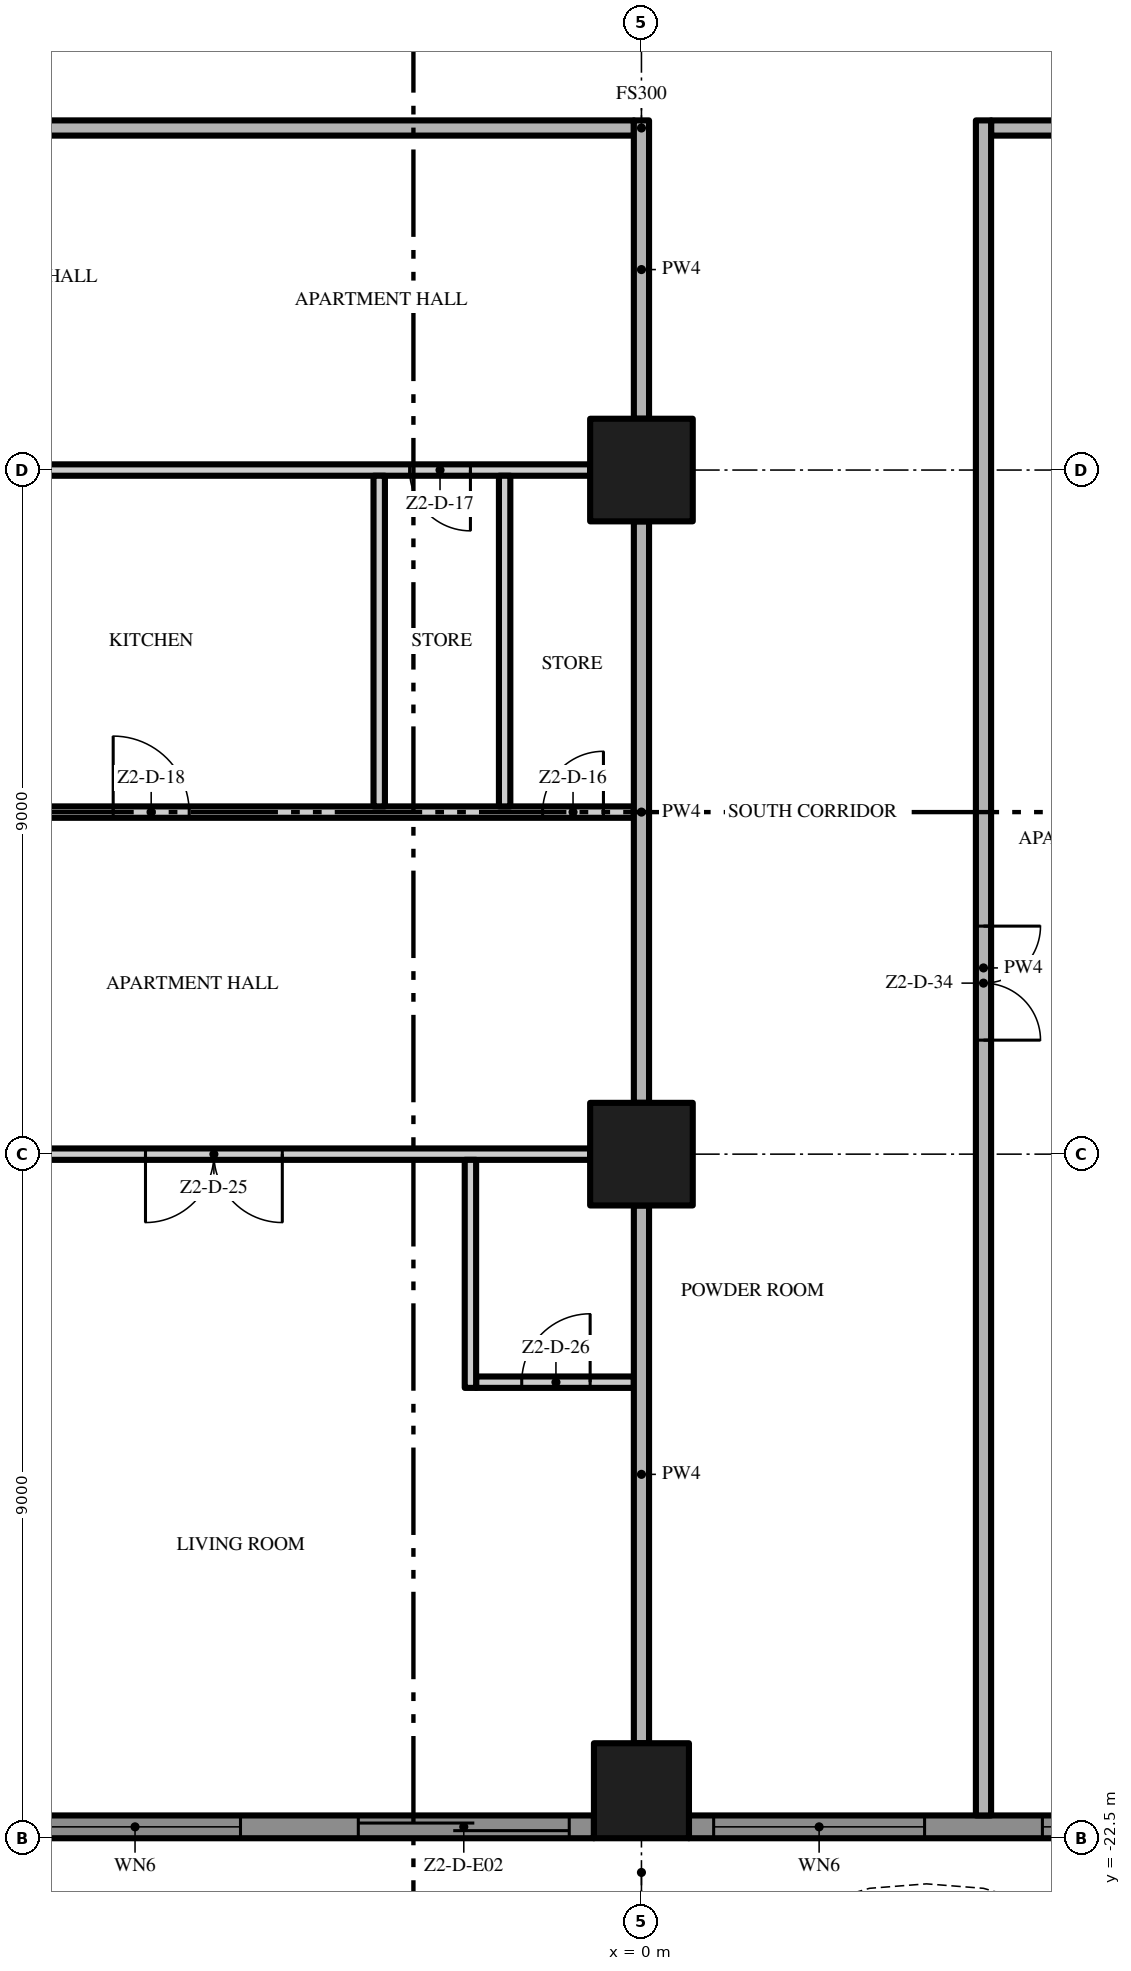
"""IFC4 building model, lengths in metres.
Left out: names, types, materials, properties, quantities, classifications, styles, units other than length and angle.
Written with IfcOpenShell. Run it as: python <this file> out.ifc"""

import sys

from ifc_helpers import new_model, si_unit, direction, frame, frame_2d, origin, origin_2d, place, context, subcontext, project, spatial, polyline, rectangle, outline, extrude, element, fill, save


model = new_model("IFC4")
c1 = context("Model", 3, precision=1e-05, world=origin(), true_north=direction((0.0, 1.0)))
c2 = subcontext(c1, "Body", "Model", "MODEL_VIEW")
j1 = project(units=[si_unit("LENGTHUNIT", "METRE"), si_unit("PLANEANGLEUNIT", "RADIAN")], contexts=[c1])
p1 = place(None, origin())
s1 = spatial("IfcSite", under=j1, at=p1, CompositionType="ELEMENT")
p2 = place(p1, origin())
s2 = spatial("IfcBuilding", under=s1, at=p2, CompositionType="ELEMENT")
p3 = place(p2, frame((0.0, 0.0, 107.4)))
s3 = spatial("IfcBuildingStorey", under=s2, at=p3, CompositionType="ELEMENT", Elevation=107.4)
p4 = place(p3, frame((0.0, -13.5, 0.0), z_axis=(0.0, 0.0, 1.0), x_axis=(1.0, 0.0, 0.0)))
e1 = element("IfcColumn", 1, at=p4, inside=s3, PredefinedType="COLUMN", context=c2, shape_type="SweptSolid", body=[
    extrude(rectangle(XDim=1.35, YDim=1.35, at=origin_2d()), origin(), (0.0, 0.0, 1.0), 3.5),
])
p5 = place(p3, frame((0.0, -21.875, 0.0), z_axis=(0.0, 0.0, 1.0), x_axis=(1.0, 0.0, 0.0)))
e2 = element("IfcColumn", 2, at=p5, inside=s3, PredefinedType="COLUMN", context=c2, shape_type="SweptSolid", body=[
    extrude(rectangle(XDim=1.25, YDim=1.25, at=origin_2d()), origin(), (0.0, 0.0, 1.0), 3.5),
])
p6 = place(p3, frame((0.0, -4.5, 0.0), z_axis=(0.0, 0.0, 1.0), x_axis=(1.0, 0.0, 0.0)))
e3 = element("IfcColumn", 3, at=p6, inside=s3, PredefinedType="COLUMN", context=c2, shape_type="SweptSolid", body=[
    extrude(rectangle(XDim=1.35, YDim=1.35, at=origin_2d()), origin(), (0.0, 0.0, 1.0), 3.5),
])
p7 = place(p3, frame((-0.625, -22.35, 0.0), z_axis=(0.0, 0.0, 1.0), x_axis=(-1.0, 0.0, 0.0)))
e4 = element("IfcWall", 4, at=p7, inside=s3, PredefinedType="SOLIDWALL", context=c2, shape_type="SweptSolid", body=[
    extrude(rectangle(XDim=7.75, YDim=0.3, at=frame_2d((3.875, 0.0))), origin(), (0.0, 0.0, 1.0), 3.5),
])
p8 = place(p7, frame((4.65, 0.0, 0.45)))
e5 = element("IfcOpeningElement", 5, at=p8, cuts=e4, PredefinedType="OPENING", context=c2, shape_type="SweptSolid", body=[
    extrude(rectangle(XDim=2.775, YDim=2.65, at=frame_2d((1.387, 1.325))), frame((0.0, 0.16, 0.0), z_axis=(0.0, -1.0, 0.0), x_axis=(1.0, 0.0, 0.0)), (0.0, 0.0, 1.0), 0.32),
])
p9 = place(p7, frame((0.325, 0.0, 0.0)))
e6 = element("IfcOpeningElement", 6, at=p9, cuts=e4, PredefinedType="OPENING", context=c2, shape_type="SweptSolid", body=[
    extrude(rectangle(XDim=2.775, YDim=2.4, at=frame_2d((1.387, 1.2))), frame((0.0, 0.16, 0.0), z_axis=(0.0, -1.0, 0.0), x_axis=(1.0, 0.0, 0.0)), (0.0, 0.0, 1.0), 0.32),
])
p10 = place(p3, frame((8.375, -22.35, 0.0), z_axis=(0.0, 0.0, 1.0), x_axis=(-1.0, 0.0, 0.0)))
e7 = element("IfcWall", 7, at=p10, inside=s3, PredefinedType="SOLIDWALL", context=c2, shape_type="SweptSolid", body=[
    extrude(rectangle(XDim=7.75, YDim=0.3, at=frame_2d((3.875, 0.0))), origin(), (0.0, 0.0, 1.0), 3.5),
])
p11 = place(p10, frame((4.65, 0.0, 0.45)))
e8 = element("IfcOpeningElement", 8, at=p11, cuts=e7, PredefinedType="OPENING", context=c2, shape_type="SweptSolid", body=[
    extrude(rectangle(XDim=2.775, YDim=2.65, at=frame_2d((1.387, 1.325))), frame((0.0, 0.16, 0.0), z_axis=(0.0, -1.0, 0.0), x_axis=(1.0, 0.0, 0.0)), (0.0, 0.0, 1.0), 0.32),
])
p12 = place(p10, frame((0.325, 0.0, 0.45)))
e9 = element("IfcOpeningElement", 9, at=p12, cuts=e7, PredefinedType="OPENING", context=c2, shape_type="SweptSolid", body=[
    extrude(rectangle(XDim=2.775, YDim=2.65, at=frame_2d((1.387, 1.325))), frame((0.0, 0.16, 0.0), z_axis=(0.0, -1.0, 0.0), x_axis=(1.0, 0.0, 0.0)), (0.0, 0.0, 1.0), 0.32),
])
p13 = place(p3, origin())
e10 = element("IfcWall", 10, at=p13, inside=s3, PredefinedType="USERDEFINED", context=c2, shape_type="SweptSolid", body=[
    extrude(outline(polyline([(-22.5, -24.3), (-21.0, -25.005), (-19.5, -25.441), (-18.75, -25.5), (-18.0, -25.441), (-16.5, -25.005), (-15.0, -24.3), (-13.5, -23.595), (-12.0, -23.159), (-11.25, -23.1), (-10.5, -23.159), (-9.0, -23.595), (-7.5, -24.3), (-6.0, -25.005), (-4.5, -25.441), (-3.75, -25.5), (-3.0, -25.441), (-1.5, -25.005), (0.0, -24.3), (1.5, -23.595), (3.0, -23.159), (3.75, -23.1), (4.5, -23.159), (6.0, -23.595), (7.5, -24.3), (9.0, -25.005), (10.5, -25.441), (11.25, -25.5), (12.0, -25.441), (13.5, -25.005), (15.0, -24.3), (16.5, -23.595), (18.0, -23.159), (18.75, -23.1), (19.5, -23.159), (21.0, -23.595), (22.5, -24.3), (22.606, -24.074), (21.089, -23.36), (19.545, -22.911), (18.75, -22.849), (17.955, -22.911), (16.411, -23.36), (14.894, -24.074), (13.411, -24.771), (11.955, -25.194), (11.25, -25.249), (10.545, -25.194), (9.089, -24.771), (7.606, -24.074), (6.089, -23.36), (4.545, -22.911), (3.75, -22.849), (2.955, -22.911), (1.411, -23.36), (-0.106, -24.074), (-1.589, -24.771), (-3.045, -25.194), (-3.75, -25.249), (-4.455, -25.194), (-5.911, -24.771), (-7.394, -24.074), (-8.911, -23.36), (-10.455, -22.911), (-11.25, -22.849), (-12.045, -22.911), (-13.589, -23.36), (-15.106, -24.074), (-16.589, -24.771), (-18.045, -25.194), (-18.75, -25.249), (-19.455, -25.194), (-20.911, -24.771), (-22.394, -24.074), (-22.5, -24.3)])), origin(), (0.0, 0.0, 1.0), 0.9),
])
p14 = place(p3, frame((-2.175, -16.5, 0.0), z_axis=(0.0, 0.0, 1.0), x_axis=(1.0, 0.0, 0.0)))
e11 = element("IfcWall", 11, at=p14, inside=s3, PredefinedType="PARTITIONING", context=c2, shape_type="SweptSolid", body=[
    extrude(rectangle(XDim=2.075, YDim=0.15, at=frame_2d((1.038, 0.0))), origin(), (0.0, 0.0, 1.0), 3.5),
])
p15 = place(p14, frame((0.6, 0.0, 0.0)))
e12 = element("IfcOpeningElement", 12, at=p15, cuts=e11, PredefinedType="OPENING", context=c2, shape_type="SweptSolid", body=[
    extrude(rectangle(XDim=0.9, YDim=2.1, at=frame_2d((0.45, 1.05))), frame((0.0, 0.085, 0.0), z_axis=(0.0, -1.0, 0.0), x_axis=(1.0, 0.0, 0.0)), (0.0, 0.0, 1.0), 0.17),
])
p16 = place(p3, frame((-0.675, -13.5, 0.0), z_axis=(0.0, 0.0, 1.0), x_axis=(-1.0, 0.0, 0.0)))
e13 = element("IfcWall", 13, at=p16, inside=s3, PredefinedType="PARTITIONING", context=c2, shape_type="SweptSolid", body=[
    extrude(rectangle(XDim=7.65, YDim=0.15, at=frame_2d((3.825, 0.0))), origin(), (0.0, 0.0, 1.0), 3.5),
])
p17 = place(p16, frame((4.05, 0.0, 0.0)))
e14 = element("IfcOpeningElement", 14, at=p17, cuts=e13, PredefinedType="OPENING", context=c2, shape_type="SweptSolid", body=[
    extrude(rectangle(XDim=1.8, YDim=2.4, at=frame_2d((0.9, 1.2))), frame((0.0, 0.085, 0.0), z_axis=(0.0, -1.0, 0.0), x_axis=(1.0, 0.0, 0.0)), (0.0, 0.0, 1.0), 0.17),
])
p18 = place(p3, frame((-11.625, -9.0, 0.0), z_axis=(0.0, 0.0, 1.0), x_axis=(1.0, 0.0, 0.0)))
e15 = element("IfcWall", 15, at=p18, inside=s3, PredefinedType="PARTITIONING", context=c2, shape_type="SweptSolid", body=[
    extrude(rectangle(XDim=11.525, YDim=0.15, at=frame_2d((5.763, 0.0))), origin(), (0.0, 0.0, 1.0), 3.5),
])
p19 = place(p18, frame((10.325, 0.0, 0.0)))
e16 = element("IfcOpeningElement", 16, at=p19, cuts=e15, PredefinedType="OPENING", context=c2, shape_type="SweptSolid", body=[
    extrude(rectangle(XDim=0.8, YDim=2.0, at=frame_2d((0.4, 1.0))), frame((0.0, 0.085, 0.0), z_axis=(0.0, -1.0, 0.0), x_axis=(1.0, 0.0, 0.0)), (0.0, 0.0, 1.0), 0.17),
])
p20 = place(p18, frame((4.675, 0.0, 0.0)))
e17 = element("IfcOpeningElement", 17, at=p20, cuts=e15, PredefinedType="OPENING", context=c2, shape_type="SweptSolid", body=[
    extrude(rectangle(XDim=1.0, YDim=2.4, at=frame_2d((0.5, 1.2))), frame((0.0, 0.085, 0.0), z_axis=(0.0, -1.0, 0.0), x_axis=(1.0, 0.0, 0.0)), (0.0, 0.0, 1.0), 0.17),
])
p21 = place(p3, frame((-0.675, -4.5, 0.0), z_axis=(0.0, 0.0, 1.0), x_axis=(-1.0, 0.0, 0.0)))
e18 = element("IfcWall", 18, at=p21, inside=s3, PredefinedType="PARTITIONING", context=c2, shape_type="SweptSolid", body=[
    extrude(rectangle(XDim=7.65, YDim=0.15, at=frame_2d((3.825, 0.0))), origin(), (0.0, 0.0, 1.0), 3.5),
])
p22 = place(p21, frame((1.575, 0.0, 0.0)))
e19 = element("IfcOpeningElement", 19, at=p22, cuts=e18, PredefinedType="OPENING", context=c2, shape_type="SweptSolid", body=[
    extrude(rectangle(XDim=0.8, YDim=2.0, at=frame_2d((0.4, 1.0))), frame((0.0, 0.085, 0.0), z_axis=(0.0, -1.0, 0.0), x_axis=(1.0, 0.0, 0.0)), (0.0, 0.0, 1.0), 0.17),
])
p23 = place(p3, frame((-0.1, 0.0, 0.0), z_axis=(0.0, 0.0, 1.0), x_axis=(-1.0, 0.0, 0.0)))
e20 = element("IfcWall", 20, at=p23, inside=s3, PredefinedType="PARTITIONING", context=c2, shape_type="SweptSolid", body=[
    extrude(rectangle(XDim=17.3, YDim=0.2, at=frame_2d((8.65, 0.0))), origin(), (0.0, 0.0, 1.0), 3.5),
])
p24 = place(p23, frame((8.15, 0.0, 0.0)))
e21 = element("IfcOpeningElement", 21, at=p24, cuts=e20, PredefinedType="OPENING", context=c2, shape_type="SweptSolid", body=[
    extrude(rectangle(XDim=1.5, YDim=2.4, at=frame_2d((0.75, 1.2))), frame((0.0, 0.11, 0.0), z_axis=(0.0, -1.0, 0.0), x_axis=(1.0, 0.0, 0.0)), (0.0, 0.0, 1.0), 0.22),
])
p25 = place(p3, frame((4.6, 0.0, 0.0), z_axis=(0.0, 0.0, 1.0), x_axis=(1.0, 0.0, 0.0)))
e22 = element("IfcWall", 22, at=p25, inside=s3, PredefinedType="PARTITIONING", context=c2, shape_type="SweptSolid", body=[
    extrude(rectangle(XDim=12.8, YDim=0.2, at=frame_2d((6.4, 0.0))), origin(), (0.0, 0.0, 1.0), 3.5),
])
p26 = place(p3, frame((-3.45, -8.925, 0.0), z_axis=(0.0, 0.0, 1.0), x_axis=(0.0, 1.0, 0.0)))
e23 = element("IfcWall", 23, at=p26, inside=s3, PredefinedType="PARTITIONING", context=c2, shape_type="SweptSolid", body=[
    extrude(rectangle(XDim=4.35, YDim=0.15, at=frame_2d((2.175, 0.0))), origin(), (0.0, 0.0, 1.0), 3.5),
])
p27 = place(p3, frame((-2.25, -16.575, 0.0), z_axis=(0.0, 0.0, 1.0), x_axis=(0.0, 1.0, 0.0)))
e24 = element("IfcWall", 24, at=p27, inside=s3, PredefinedType="PARTITIONING", context=c2, shape_type="SweptSolid", body=[
    extrude(rectangle(XDim=3.0, YDim=0.15, at=frame_2d((1.5, 0.0))), origin(), (0.0, 0.0, 1.0), 3.5),
])
p28 = place(p3, frame((-1.8, -8.925, 0.0), z_axis=(0.0, 0.0, 1.0), x_axis=(0.0, 1.0, 0.0)))
e25 = element("IfcWall", 25, at=p28, inside=s3, PredefinedType="PARTITIONING", context=c2, shape_type="SweptSolid", body=[
    extrude(rectangle(XDim=4.35, YDim=0.15, at=frame_2d((2.175, 0.0))), origin(), (0.0, 0.0, 1.0), 3.5),
])
p29 = place(p3, frame((0.0, -21.25, 0.0), z_axis=(0.0, 0.0, 1.0), x_axis=(0.0, 1.0, 0.0)))
e26 = element("IfcWall", 26, at=p29, inside=s3, PredefinedType="PARTITIONING", context=c2, shape_type="SweptSolid", body=[
    extrude(rectangle(XDim=7.075, YDim=0.2, at=frame_2d((3.538, 0.0))), origin(), (0.0, 0.0, 1.0), 3.5),
])
p30 = place(p3, frame((0.0, -12.825, 0.0), z_axis=(0.0, 0.0, 1.0), x_axis=(0.0, 1.0, 0.0)))
e27 = element("IfcWall", 27, at=p30, inside=s3, PredefinedType="PARTITIONING", context=c2, shape_type="SweptSolid", body=[
    extrude(rectangle(XDim=7.65, YDim=0.2, at=frame_2d((3.825, 0.0))), origin(), (0.0, 0.0, 1.0), 3.5),
])
p31 = place(p3, frame((0.0, -3.825, 0.0), z_axis=(0.0, 0.0, 1.0), x_axis=(0.0, 1.0, 0.0)))
e28 = element("IfcWall", 28, at=p31, inside=s3, PredefinedType="PARTITIONING", context=c2, shape_type="SweptSolid", body=[
    extrude(rectangle(XDim=3.925, YDim=0.2, at=frame_2d((1.962, 0.0))), origin(), (0.0, 0.0, 1.0), 3.5),
])
p32 = place(p3, frame((4.5, 0.1, 0.0), z_axis=(0.0, 0.0, 1.0), x_axis=(0.0, -1.0, 0.0)))
e29 = element("IfcWall", 29, at=p32, inside=s3, PredefinedType="PARTITIONING", context=c2, shape_type="SweptSolid", body=[
    extrude(rectangle(XDim=22.3, YDim=0.2, at=frame_2d((11.15, 0.0))), origin(), (0.0, 0.0, 1.0), 3.5),
])
p33 = place(p32, frame((10.6, 0.0, 0.0)))
e30 = element("IfcOpeningElement", 30, at=p33, cuts=e29, PredefinedType="OPENING", context=c2, shape_type="SweptSolid", body=[
    extrude(rectangle(XDim=1.5, YDim=2.4, at=frame_2d((0.75, 1.2))), frame((0.0, 0.11, 0.0), z_axis=(0.0, -1.0, 0.0), x_axis=(1.0, 0.0, 0.0)), (0.0, 0.0, 1.0), 0.22),
])
p34 = place(p8, origin())
e31 = element("IfcWindow", 31, at=p34, inside=s3, PartitioningType="SINGLE_PANEL", PredefinedType="WINDOW", context=c2, shape_type="SweptSolid", body=[
    extrude(rectangle(XDim=2.775, YDim=2.65, at=frame_2d((1.387, 1.325))), frame((0.0, 0.03, 0.0), z_axis=(0.0, -1.0, 0.0), x_axis=(1.0, 0.0, 0.0)), (0.0, 0.0, 1.0), 0.06),
])
fill(e5, e31)
p35 = place(p9, origin())
e32 = element("IfcDoor", 32, at=p35, inside=s3, OperationType="SINGLE_SWING_LEFT", PredefinedType="DOOR", context=c2, shape_type="SweptSolid", body=[
    extrude(rectangle(XDim=2.775, YDim=2.4, at=frame_2d((1.387, 1.2))), frame((0.0, 0.025, 0.0), z_axis=(0.0, -1.0, 0.0), x_axis=(1.0, 0.0, 0.0)), (0.0, 0.0, 1.0), 0.05),
])
fill(e6, e32)
p36 = place(p11, origin())
e33 = element("IfcWindow", 33, at=p36, inside=s3, PartitioningType="SINGLE_PANEL", PredefinedType="WINDOW", context=c2, shape_type="SweptSolid", body=[
    extrude(rectangle(XDim=2.775, YDim=2.65, at=frame_2d((1.387, 1.325))), frame((0.0, 0.03, 0.0), z_axis=(0.0, -1.0, 0.0), x_axis=(1.0, 0.0, 0.0)), (0.0, 0.0, 1.0), 0.06),
])
fill(e8, e33)
p37 = place(p12, origin())
e34 = element("IfcWindow", 34, at=p37, inside=s3, PartitioningType="SINGLE_PANEL", PredefinedType="WINDOW", context=c2, shape_type="SweptSolid", body=[
    extrude(rectangle(XDim=2.775, YDim=2.65, at=frame_2d((1.387, 1.325))), frame((0.0, 0.03, 0.0), z_axis=(0.0, -1.0, 0.0), x_axis=(1.0, 0.0, 0.0)), (0.0, 0.0, 1.0), 0.06),
])
fill(e9, e34)
p38 = place(p19, origin())
e35 = element("IfcDoor", 35, at=p38, inside=s3, OperationType="SINGLE_SWING_RIGHT", PredefinedType="DOOR", context=c2, shape_type="SweptSolid", body=[
    extrude(rectangle(XDim=0.8, YDim=2.0, at=frame_2d((0.4, 1.0))), frame((0.0, 0.025, 0.0), z_axis=(0.0, -1.0, 0.0), x_axis=(1.0, 0.0, 0.0)), (0.0, 0.0, 1.0), 0.05),
])
fill(e16, e35)
p39 = place(p22, origin())
e36 = element("IfcDoor", 36, at=p39, inside=s3, OperationType="SINGLE_SWING_LEFT", PredefinedType="DOOR", context=c2, shape_type="SweptSolid", body=[
    extrude(rectangle(XDim=0.8, YDim=2.0, at=frame_2d((0.4, 1.0))), frame((0.0, 0.025, 0.0), z_axis=(0.0, -1.0, 0.0), x_axis=(1.0, 0.0, 0.0)), (0.0, 0.0, 1.0), 0.05),
])
fill(e19, e36)
p40 = place(p20, origin())
e37 = element("IfcDoor", 37, at=p40, inside=s3, OperationType="SINGLE_SWING_LEFT", PredefinedType="DOOR", context=c2, shape_type="SweptSolid", body=[
    extrude(rectangle(XDim=1.0, YDim=2.4, at=frame_2d((0.5, 1.2))), frame((0.0, 0.025, 0.0), z_axis=(0.0, -1.0, 0.0), x_axis=(1.0, 0.0, 0.0)), (0.0, 0.0, 1.0), 0.05),
])
fill(e17, e37)
p41 = place(p17, origin())
e38 = element("IfcDoor", 38, at=p41, inside=s3, OperationType="DOUBLE_DOOR_SINGLE_SWING", PredefinedType="DOOR", context=c2, shape_type="SweptSolid", body=[
    extrude(rectangle(XDim=1.8, YDim=2.4, at=frame_2d((0.9, 1.2))), frame((0.0, 0.025, 0.0), z_axis=(0.0, -1.0, 0.0), x_axis=(1.0, 0.0, 0.0)), (0.0, 0.0, 1.0), 0.05),
])
fill(e14, e38)
p42 = place(p15, origin())
e39 = element("IfcDoor", 39, at=p42, inside=s3, OperationType="SINGLE_SWING_RIGHT", PredefinedType="DOOR", context=c2, shape_type="SweptSolid", body=[
    extrude(rectangle(XDim=0.9, YDim=2.1, at=frame_2d((0.45, 1.05))), frame((0.0, 0.025, 0.0), z_axis=(0.0, -1.0, 0.0), x_axis=(1.0, 0.0, 0.0)), (0.0, 0.0, 1.0), 0.05),
])
fill(e12, e39)
p43 = place(p33, origin())
e40 = element("IfcDoor", 40, at=p43, inside=s3, OperationType="DOUBLE_DOOR_SINGLE_SWING", PredefinedType="DOOR", context=c2, shape_type="SweptSolid", body=[
    extrude(rectangle(XDim=1.5, YDim=2.4, at=frame_2d((0.75, 1.2))), frame((0.0, 0.025, 0.0), z_axis=(0.0, -1.0, 0.0), x_axis=(1.0, 0.0, 0.0)), (0.0, 0.0, 1.0), 0.05),
])
fill(e30, e40)
save(model, sys.argv[1])
